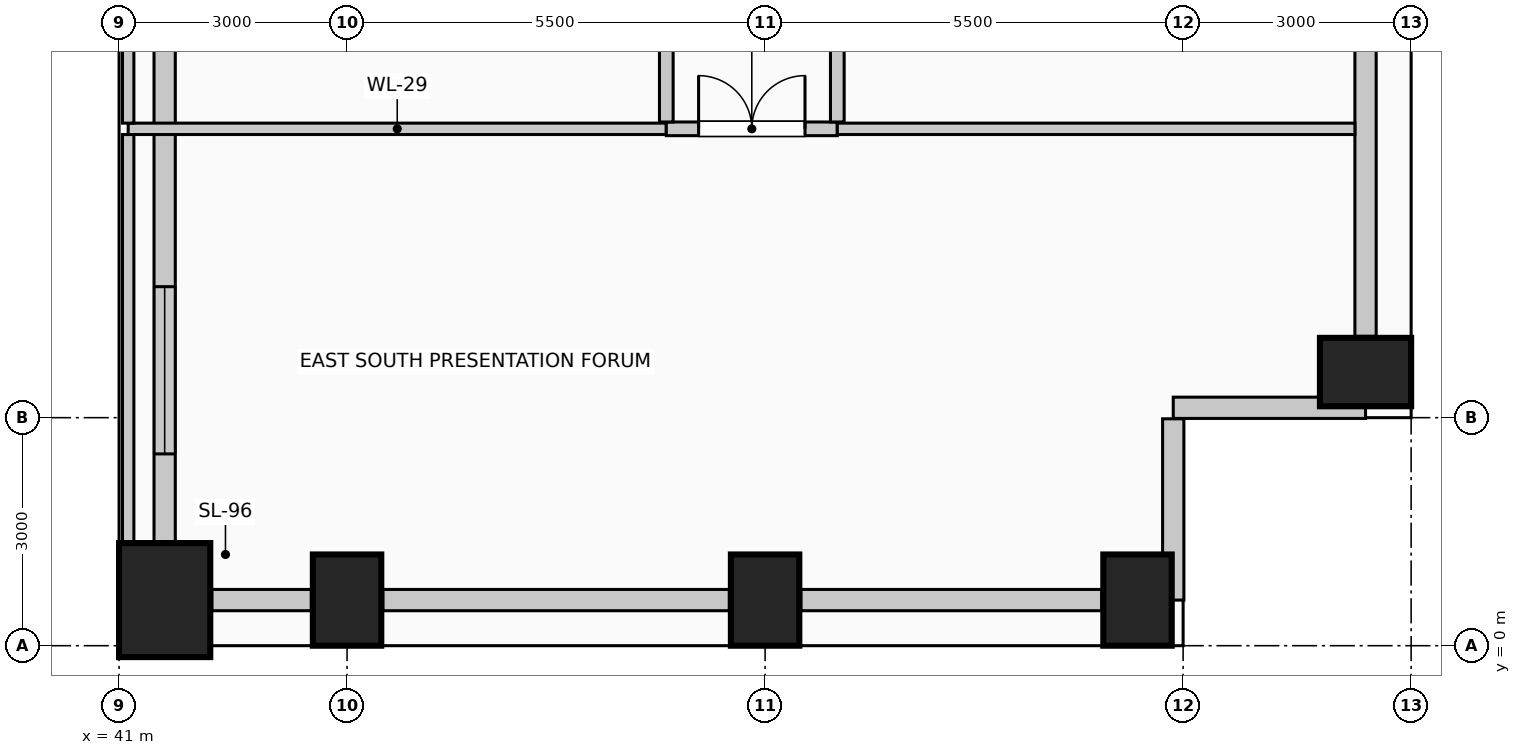
"""IFC4 building model, lengths in metres.
Left out: names, types, materials, properties, quantities, classifications, styles, units other than length and angle.
Written with IfcOpenShell. Run it as: python <this file> out.ifc"""

import sys

from ifc_helpers import new_model, si_unit, direction, frame, frame_2d, origin, origin_2d, place, context, subcontext, project, spatial, rectangle, extrude, element, fill, save


model = new_model("IFC4")
c1 = context("Model", 3, precision=1e-05, world=origin(), true_north=direction((0.0, 1.0)))
c2 = subcontext(c1, "Body", "Model", "MODEL_VIEW")
j1 = project(units=[si_unit("LENGTHUNIT", "METRE"), si_unit("PLANEANGLEUNIT", "RADIAN")], contexts=[c1])
p1 = place(None, origin())
s1 = spatial("IfcSite", under=j1, at=p1, CompositionType="ELEMENT")
p2 = place(p1, origin())
s2 = spatial("IfcBuilding", under=s1, at=p2, CompositionType="ELEMENT")
p3 = place(p2, frame((0.0, 0.0, 38.6)))
s3 = spatial("IfcBuildingStorey", under=s2, at=p3, CompositionType="ELEMENT", Elevation=38.6)
p4 = place(p3, frame((41.6, 0.6, 0.0), z_axis=(0.0, 0.0, 1.0), x_axis=(1.0, 0.0, 0.0)))
e1 = element("IfcColumn", 1, at=p4, inside=s3, PredefinedType="COLUMN", context=c2, shape_type="SweptSolid", body=[
    extrude(rectangle(XDim=1.2, YDim=1.5, at=origin_2d()), origin(), (0.0, 0.0, 1.0), 4.0),
])
for number, where, z_axis, x_axis in (
    (2, (44.0, 0.6, 0.0), (0.0, 0.0, 1.0), (1.0, 0.0, 0.0)),
    (3, (49.5, 0.6, 0.0), (0.0, 0.0, 1.0), (1.0, 0.0, 0.0)),
    (4, (54.4, 0.6, 0.0), (0.0, 0.0, 1.0), (1.0, 0.0, 0.0)),
    (5, (57.4, 3.6, 0.0), (0.0, 0.0, 1.0), (0.0, 1.0, 0.0)),
):
    element("IfcColumn", number, at=place(p3, frame(where, z_axis=z_axis, x_axis=x_axis)), inside=s3, PredefinedType="COLUMN", context=c2, shape_type="SweptSolid", body=[
        extrude(rectangle(XDim=0.9, YDim=1.2, at=origin_2d()), origin(), (0.0, 0.0, 1.0), 4.0),
    ])
p5 = place(p3, frame((43.53, 0.6, 0.0), z_axis=(0.0, 0.0, 1.0), x_axis=(-1.0, 0.0, 0.0)))
e6 = element("IfcWall", 6, at=p5, inside=s3, PredefinedType="SOLIDWALL", context=c2, shape_type="SweptSolid", body=[
    extrude(rectangle(XDim=1.31, YDim=0.28, at=frame_2d((0.655, 0.0))), origin(), (0.0, 0.0, 1.0), 2.85),
])
p6 = place(p3, frame((49.03, 0.6, 0.0), z_axis=(0.0, 0.0, 1.0), x_axis=(-1.0, 0.0, 0.0)))
e7 = element("IfcWall", 7, at=p6, inside=s3, PredefinedType="SOLIDWALL", context=c2, shape_type="SweptSolid", body=[
    extrude(rectangle(XDim=4.56, YDim=0.28, at=frame_2d((2.28, 0.0))), origin(), (0.0, 0.0, 1.0), 2.85),
])
p7 = place(p3, frame((53.93, 0.6, 0.0), z_axis=(0.0, 0.0, 1.0), x_axis=(-1.0, 0.0, 0.0)))
e8 = element("IfcWall", 8, at=p7, inside=s3, PredefinedType="SOLIDWALL", context=c2, shape_type="SweptSolid", body=[
    extrude(rectangle(XDim=3.96, YDim=0.28, at=frame_2d((1.98, 0.0))), origin(), (0.0, 0.0, 1.0), 2.85),
])
p8 = place(p3, frame((57.4, 9.53, 0.0), z_axis=(0.0, 0.0, 1.0), x_axis=(0.0, -1.0, 0.0)))
e9 = element("IfcWall", 9, at=p8, inside=s3, PredefinedType="SOLIDWALL", context=c2, shape_type="SweptSolid", body=[
    extrude(rectangle(XDim=5.46, YDim=0.28, at=frame_2d((2.73, 0.0))), origin(), (0.0, 0.0, 1.0), 2.85),
])
p9 = place(p3, frame((57.4, 3.13, 0.0), z_axis=(0.0, 0.0, 1.0), x_axis=(-1.0, 0.0, 0.0)))
e10 = element("IfcWall", 10, at=p9, inside=s3, PredefinedType="SOLIDWALL", context=c2, shape_type="SweptSolid", body=[
    extrude(rectangle(XDim=2.53, YDim=0.28, at=frame_2d((1.265, 0.0))), origin(), (0.0, 0.0, 1.0), 3.7),
])
p10 = place(p3, frame((54.87, 2.985, 0.0), z_axis=(0.0, 0.0, 1.0), x_axis=(0.0, -1.0, 0.0)))
e11 = element("IfcWall", 11, at=p10, inside=s3, PredefinedType="SOLIDWALL", context=c2, shape_type="SweptSolid", body=[
    extrude(rectangle(XDim=2.385, YDim=0.28, at=frame_2d((1.192, 0.0))), origin(), (0.0, 0.0, 1.0), 3.7),
])
p11 = place(p3, frame((41.6, 1.37, 0.0), z_axis=(0.0, 0.0, 1.0), x_axis=(0.0, 1.0, 0.0)))
e12 = element("IfcWall", 12, at=p11, inside=s3, PredefinedType="SOLIDWALL", context=c2, shape_type="SweptSolid", body=[
    extrude(rectangle(XDim=7.86, YDim=0.28, at=frame_2d((3.93, 0.0))), origin(), (0.0, 0.0, 1.0), 3.0),
])
p12 = place(p11, frame((1.153, 0.0, 0.42)))
e13 = element("IfcOpeningElement", 13, at=p12, cuts=e12, PredefinedType="OPENING", context=c2, shape_type="SweptSolid", body=[
    extrude(rectangle(XDim=2.2, YDim=1.95, at=frame_2d((1.1, 0.975))), frame((0.0, 0.15, 0.0), z_axis=(0.0, -1.0, 0.0), x_axis=(1.0, 0.0, 0.0)), (0.0, 0.0, 1.0), 0.3),
])
p13 = place(p3, frame((41.12, 6.8, 0.0), z_axis=(0.0, 0.0, 1.0), x_axis=(1.0, 0.0, 0.0)))
e14 = element("IfcWall", 14, at=p13, inside=s3, PredefinedType="PARTITIONING", context=c2, shape_type="SweptSolid", body=[
    extrude(rectangle(XDim=7.08, YDim=0.15, at=frame_2d((3.54, 0.0))), origin(), (0.0, 0.0, 1.0), 3.095),
])
p14 = place(p3, frame((48.2, 6.8, 0.0), z_axis=(0.0, 0.0, 1.0), x_axis=(1.0, 0.0, 0.0)))
e15 = element("IfcWall", 15, at=p14, inside=s3, PredefinedType="PARTITIONING", context=c2, shape_type="SweptSolid", body=[
    extrude(rectangle(XDim=2.25, YDim=0.18, at=frame_2d((1.125, 0.0))), origin(), (0.0, 0.0, 1.0), 3.095),
])
p15 = place(p14, frame((0.425, 0.0, 0.0)))
e16 = element("IfcOpeningElement", 16, at=p15, cuts=e15, PredefinedType="OPENING", context=c2, shape_type="SweptSolid", body=[
    extrude(rectangle(XDim=1.4, YDim=2.2, at=frame_2d((0.7, 1.1))), frame((0.0, 0.1, 0.0), z_axis=(0.0, -1.0, 0.0), x_axis=(1.0, 0.0, 0.0)), (0.0, 0.0, 1.0), 0.2),
])
p16 = place(p3, frame((50.45, 6.8, 0.0), z_axis=(0.0, 0.0, 1.0), x_axis=(1.0, 0.0, 0.0)))
e17 = element("IfcWall", 17, at=p16, inside=s3, PredefinedType="PARTITIONING", context=c2, shape_type="SweptSolid", body=[
    extrude(rectangle(XDim=6.81, YDim=0.15, at=frame_2d((3.405, 0.0))), origin(), (0.0, 0.0, 1.0), 3.095),
])
p17 = place(p3, frame((41.12, 1.35, 0.0), z_axis=(0.0, 0.0, 1.0), x_axis=(0.0, 1.0, 0.0)))
e18 = element("IfcWall", 18, at=p17, inside=s3, PredefinedType="PARTITIONING", context=c2, shape_type="SweptSolid", body=[
    extrude(rectangle(XDim=5.375, YDim=0.15, at=frame_2d((2.688, 0.0))), origin(), (0.0, 0.0, 1.0), 3.7),
])
p18 = place(p3, frame((41.12, 6.875, 0.0), z_axis=(0.0, 0.0, 1.0), x_axis=(0.0, 1.0, 0.0)))
e19 = element("IfcWall", 19, at=p18, inside=s3, PredefinedType="PARTITIONING", context=c2, shape_type="SweptSolid", body=[
    extrude(rectangle(XDim=2.375, YDim=0.15, at=frame_2d((1.188, 0.0))), origin(), (0.0, 0.0, 1.0), 3.7),
])
p19 = place(p3, frame((48.2, 6.89, 0.0), z_axis=(0.0, 0.0, 1.0), x_axis=(0.0, 1.0, 0.0)))
e20 = element("IfcWall", 20, at=p19, inside=s3, PredefinedType="PARTITIONING", context=c2, shape_type="SweptSolid", body=[
    extrude(rectangle(XDim=8.835, YDim=0.18, at=frame_2d((4.417, 0.0))), origin(), (0.0, 0.0, 1.0), 3.7),
])
p20 = place(p19, frame((3.978, 0.0, 0.0)))
e21 = element("IfcOpeningElement", 21, at=p20, cuts=e20, PredefinedType="OPENING", context=c2, shape_type="SweptSolid", body=[
    extrude(rectangle(XDim=0.88, YDim=2.1, at=frame_2d((0.44, 1.05))), frame((0.0, 0.1, 0.0), z_axis=(0.0, -1.0, 0.0), x_axis=(1.0, 0.0, 0.0)), (0.0, 0.0, 1.0), 0.2),
])
p21 = place(p3, frame((50.45, 6.89, 0.0), z_axis=(0.0, 0.0, 1.0), x_axis=(0.0, 1.0, 0.0)))
e22 = element("IfcWall", 22, at=p21, inside=s3, PredefinedType="PARTITIONING", context=c2, shape_type="SweptSolid", body=[
    extrude(rectangle(XDim=9.435, YDim=0.18, at=frame_2d((4.718, 0.0))), origin(), (0.0, 0.0, 1.0), 3.7),
])
p22 = place(p21, frame((4.242, 0.0, 0.0)))
e23 = element("IfcOpeningElement", 23, at=p22, cuts=e22, PredefinedType="OPENING", context=c2, shape_type="SweptSolid", body=[
    extrude(rectangle(XDim=0.95, YDim=2.15, at=frame_2d((0.475, 1.075))), frame((0.0, 0.1, 0.0), z_axis=(0.0, -1.0, 0.0), x_axis=(1.0, 0.0, 0.0)), (0.0, 0.0, 1.0), 0.2),
])
p23 = place(p12, origin())
e24 = element("IfcWindow", 24, at=p23, inside=s3, PartitioningType="SINGLE_PANEL", PredefinedType="WINDOW", context=c2, shape_type="SweptSolid", body=[
    extrude(rectangle(XDim=2.2, YDim=1.95, at=frame_2d((1.1, 0.975))), frame((0.0, 0.03, 0.0), z_axis=(0.0, -1.0, 0.0), x_axis=(1.0, 0.0, 0.0)), (0.0, 0.0, 1.0), 0.06),
])
fill(e13, e24)
p24 = place(p15, origin())
e25 = element("IfcDoor", 25, at=p24, inside=s3, OperationType="DOUBLE_DOOR_SINGLE_SWING", PredefinedType="DOOR", context=c2, shape_type="SweptSolid", body=[
    extrude(rectangle(XDim=1.4, YDim=2.2, at=frame_2d((0.7, 1.1))), frame((0.0, 0.025, 0.0), z_axis=(0.0, -1.0, 0.0), x_axis=(1.0, 0.0, 0.0)), (0.0, 0.0, 1.0), 0.05),
])
fill(e16, e25)
save(model, sys.argv[1])
